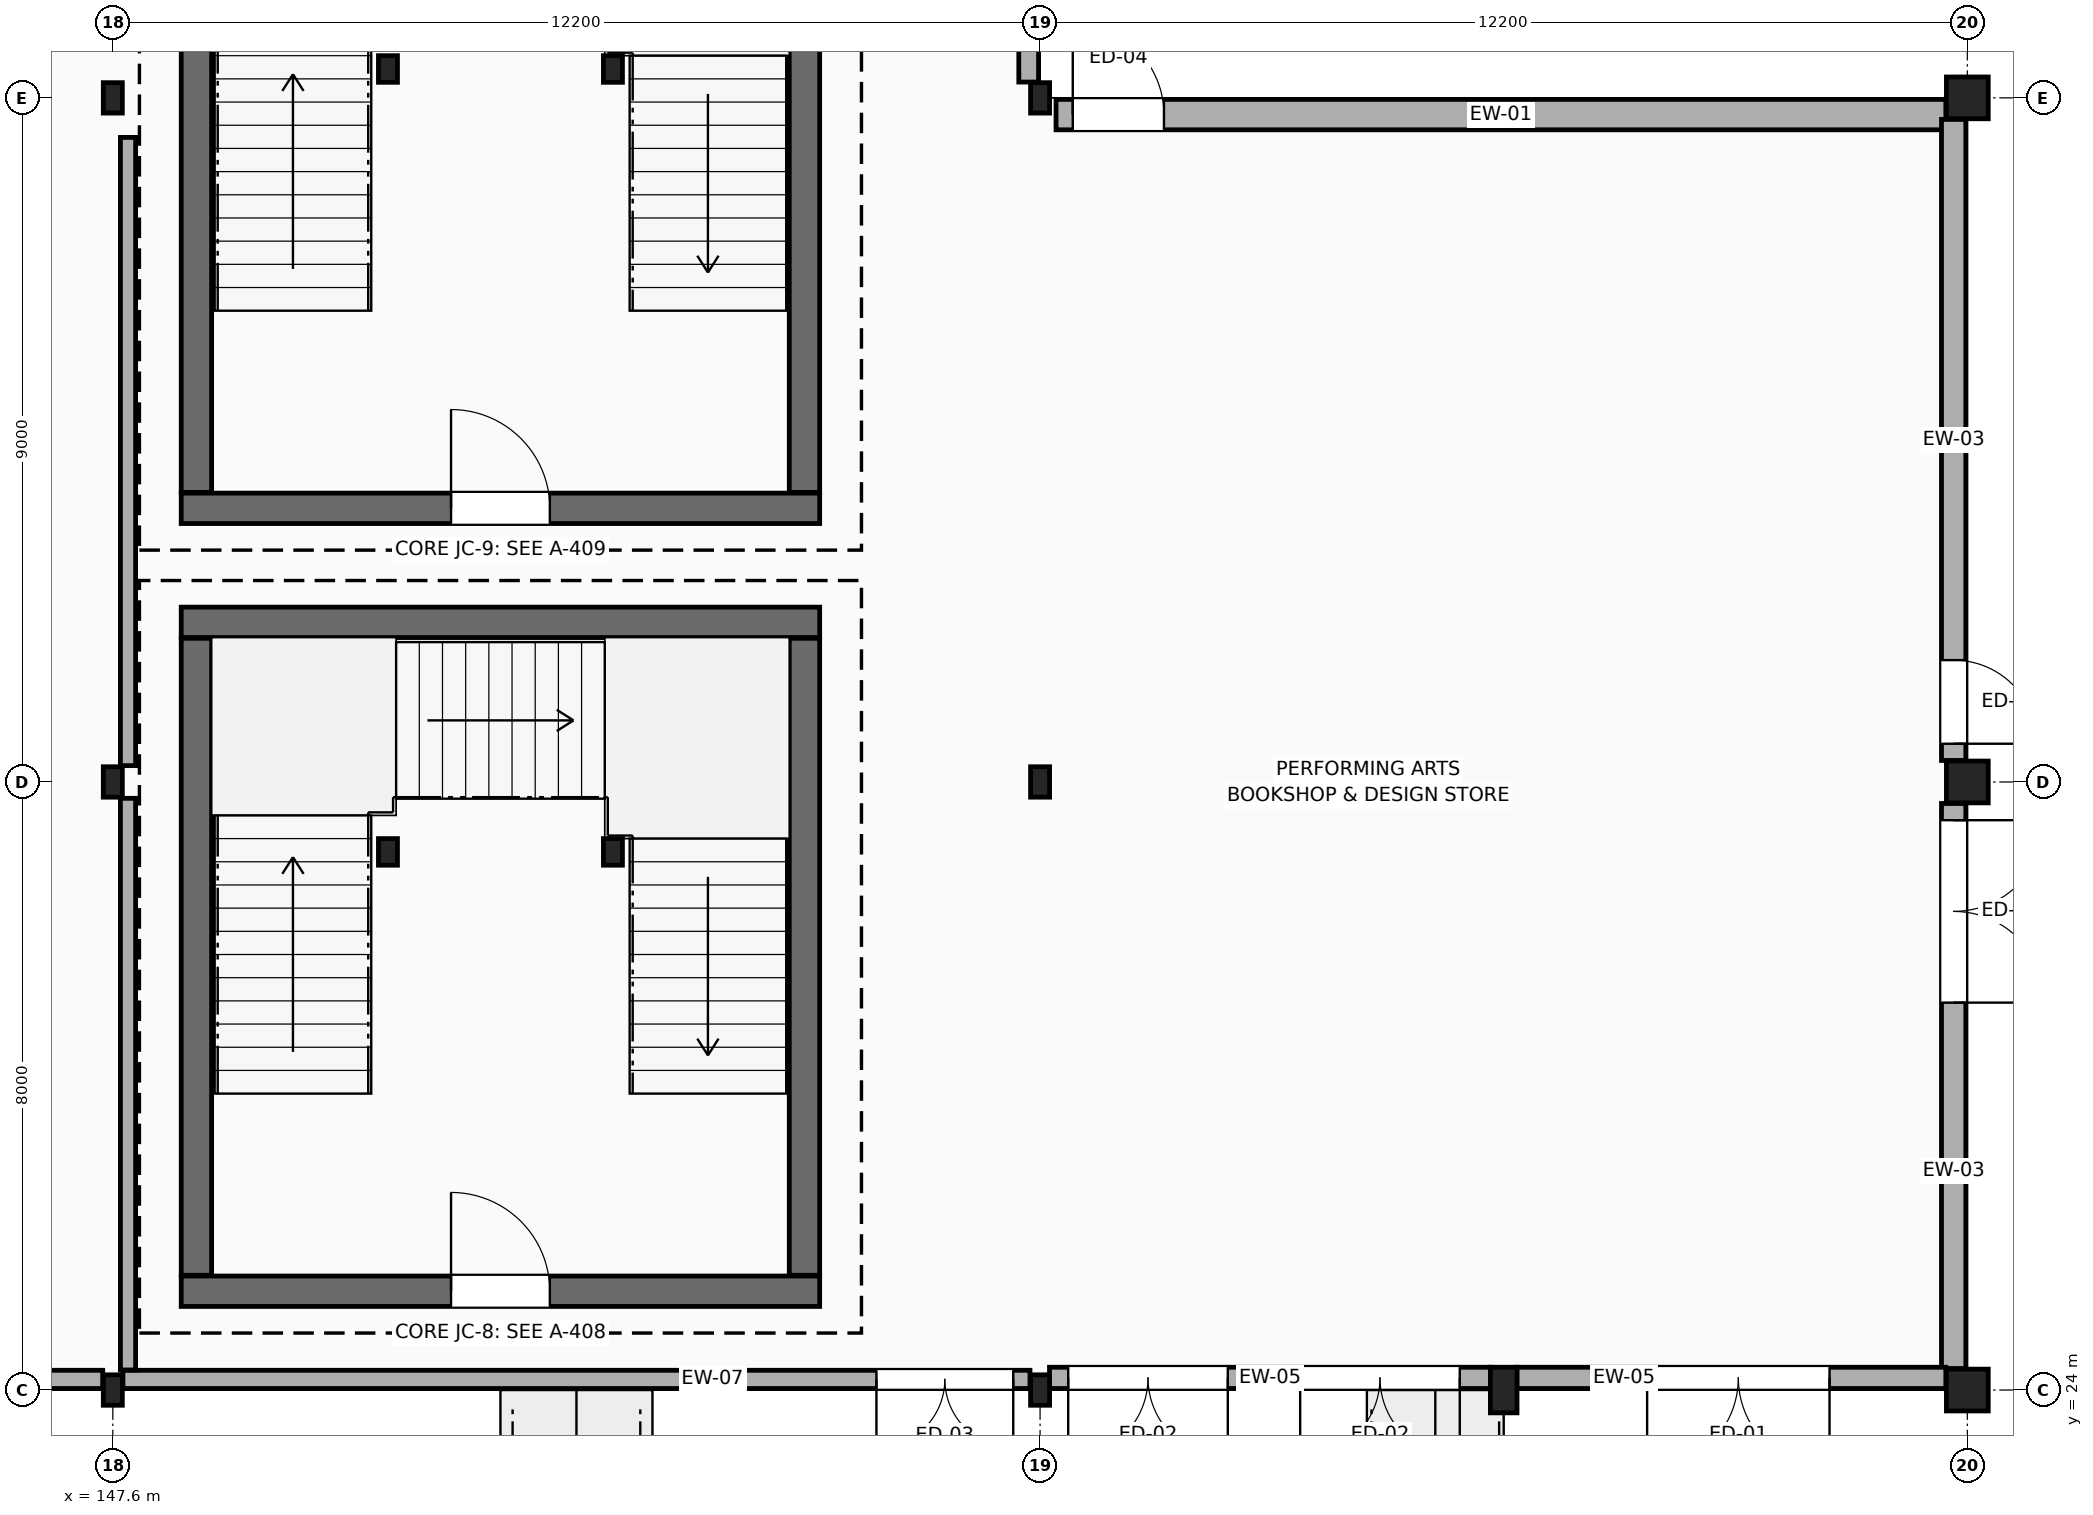
"""IFC4 building model, lengths in metres.
Left out: names, types, materials, properties, quantities, classifications, styles, units other than length and angle.
Written with IfcOpenShell. Run it as: python <this file> out.ifc"""

import sys

from ifc_helpers import new_model, si_unit, direction, frame, frame_2d, origin, origin_2d, place, context, subcontext, project, spatial, rectangle, i_section, extrude, element, fill, save


model = new_model("IFC4")
c1 = context("Model", 3, precision=1e-05, world=origin(), true_north=direction((0.0, 1.0)))
c2 = subcontext(c1, "Body", "Model", "MODEL_VIEW")
j1 = project(units=[si_unit("LENGTHUNIT", "METRE"), si_unit("PLANEANGLEUNIT", "RADIAN")], contexts=[c1])
p1 = place(None, origin())
s1 = spatial("IfcSite", under=j1, at=p1, CompositionType="ELEMENT")
p2 = place(p1, origin())
s2 = spatial("IfcBuilding", under=s1, at=p2, CompositionType="ELEMENT")
p3 = place(p2, origin())
s3 = spatial("IfcBuildingStorey", under=s2, at=p3, CompositionType="ELEMENT", Elevation=0.0)
for number, where, z_axis, x_axis in (
    (1, (147.6, 24.0, 0.0), (0.0, 0.0, 1.0), (1.0, 0.0, 0.0)),
    (2, (147.6, 32.0, 0.0), (0.0, 0.0, 1.0), (1.0, 0.0, 0.0)),
    (3, (147.6, 41.0, 0.0), (0.0, 0.0, 1.0), (1.0, 0.0, 0.0)),
    (4, (159.8, 24.0, 0.0), (0.0, 0.0, 1.0), (1.0, 0.0, 0.0)),
    (5, (159.8, 32.0, 0.0), (0.0, 0.0, 1.0), (1.0, 0.0, 0.0)),
    (6, (159.8, 41.0, 0.0), (0.0, 0.0, 1.0), (1.0, 0.0, 0.0)),
):
    element("IfcColumn", number, at=place(p3, frame(where, z_axis=z_axis, x_axis=x_axis)), inside=s3, PredefinedType="COLUMN", context=c2, shape_type="SweptSolid", body=[
        extrude(i_section(OverallWidth=0.25, OverallDepth=0.4, WebThickness=0.01, FlangeThickness=0.013, FilletRadius=0.014, at=origin_2d()), origin(), (0.0, 0.0, 1.0), 5.4),
    ])
for number, where, z_axis, x_axis in (
    (7, (172.0, 24.0, 0.0), (0.0, 0.0, 1.0), (1.0, 0.0, 0.0)),
    (8, (172.0, 32.0, 0.0), (0.0, 0.0, 1.0), (1.0, 0.0, 0.0)),
    (9, (172.0, 41.0, 0.0), (0.0, 0.0, 1.0), (1.0, 0.0, 0.0)),
):
    element("IfcColumn", number, at=place(p3, frame(where, z_axis=z_axis, x_axis=x_axis)), inside=s3, PredefinedType="COLUMN", context=c2, shape_type="SweptSolid", body=[
        extrude(rectangle(XDim=0.55, YDim=0.55, at=origin_2d()), origin(), (0.0, 0.0, 1.0), 5.36),
    ])
for number, where, z_axis, x_axis in (
    (10, (151.22, 31.08, 0.0), (0.0, 0.0, 1.0), (1.0, 0.0, 0.0)),
    (11, (154.18, 31.08, 0.0), (0.0, 0.0, 1.0), (1.0, 0.0, 0.0)),
    (12, (151.22, 41.38, 0.0), (0.0, 0.0, 1.0), (1.0, 0.0, 0.0)),
    (13, (154.18, 41.38, 0.0), (0.0, 0.0, 1.0), (1.0, 0.0, 0.0)),
):
    element("IfcColumn", number, at=place(p3, frame(where, z_axis=z_axis, x_axis=x_axis)), inside=s3, PredefinedType="COLUMN", context=c2, shape_type="SweptSolid", body=[
        extrude(i_section(OverallWidth=0.25, OverallDepth=0.35, WebThickness=0.01, FlangeThickness=0.012, FilletRadius=0.012, at=origin_2d()), origin(), (0.0, 0.0, 1.0), 5.4),
    ])
p4 = place(p3, frame((165.9, 24.0, 0.0), z_axis=(0.0, 0.0, 1.0), x_axis=(1.0, 0.0, 0.0)))
e14 = element("IfcColumn", 14, at=p4, inside=s3, PredefinedType="PILASTER", context=c2, shape_type="SweptSolid", body=[
    extrude(rectangle(XDim=0.35, YDim=0.6, at=origin_2d()), origin(), (0.0, 0.0, 1.0), 5.4),
])
p5 = place(p3, frame((159.65, 49.792, 0.0), z_axis=(0.0, 0.0, 1.0), x_axis=(0.0, -1.0, 0.0)))
e15 = element("IfcWall", 15, at=p5, inside=s3, PredefinedType="ELEMENTEDWALL", context=c2, shape_type="SweptSolid", body=[
    extrude(rectangle(XDim=8.584, YDim=0.26, at=frame_2d((4.292, 0.0))), origin(), (0.0, 0.0, 1.0), 4.655),
])
p6 = place(p5, frame((0.22, 0.0, 0.0)))
e16 = element("IfcOpeningElement", 16, at=p6, cuts=e15, PredefinedType="OPENING", context=c2, shape_type="SweptSolid", body=[
    extrude(rectangle(XDim=1.8, YDim=2.25, at=frame_2d((0.9, 1.125))), frame((0.0, 0.14, 0.0), z_axis=(0.0, -1.0, 0.0), x_axis=(1.0, 0.0, 0.0)), (0.0, 0.0, 1.0), 0.28),
])
p7 = place(p3, frame((160.01, 40.78, 0.0), z_axis=(0.0, 0.0, 1.0), x_axis=(1.0, 0.0, 0.0)))
e17 = element("IfcWall", 17, at=p7, inside=s3, PredefinedType="STANDARD", context=c2, shape_type="SweptSolid", body=[
    extrude(rectangle(XDim=11.707, YDim=0.4, at=frame_2d((5.854, 0.0))), origin(), (0.0, 0.0, 1.0), 4.555),
])
p8 = place(p7, frame((0.22, 0.0, 0.0)))
e18 = element("IfcOpeningElement", 18, at=p8, cuts=e17, PredefinedType="OPENING", context=c2, shape_type="SweptSolid", body=[
    extrude(rectangle(XDim=1.2, YDim=2.2, at=frame_2d((0.6, 1.1))), frame((0.0, 0.21, 0.0), z_axis=(0.0, -1.0, 0.0), x_axis=(1.0, 0.0, 0.0)), (0.0, 0.0, 1.0), 0.42),
])
p9 = place(p3, frame((171.82, 40.717, 0.0), z_axis=(0.0, 0.0, 1.0), x_axis=(0.0, -1.0, 0.0)))
e19 = element("IfcWall", 19, at=p9, inside=s3, PredefinedType="STANDARD", context=c2, shape_type="SweptSolid", body=[
    extrude(rectangle(XDim=8.434, YDim=0.32, at=frame_2d((4.217, 0.0))), origin(), (0.0, 0.0, 1.0), 4.605),
])
p10 = place(p9, frame((7.114, 0.0, 0.0)))
e20 = element("IfcOpeningElement", 20, at=p10, cuts=e19, PredefinedType="OPENING", context=c2, shape_type="SweptSolid", body=[
    extrude(rectangle(XDim=1.1, YDim=2.2, at=frame_2d((0.55, 1.1))), frame((0.0, 0.17, 0.0), z_axis=(0.0, -1.0, 0.0), x_axis=(1.0, 0.0, 0.0)), (0.0, 0.0, 1.0), 0.34),
])
p11 = place(p3, frame((171.82, 31.717, 0.0), z_axis=(0.0, 0.0, 1.0), x_axis=(0.0, -1.0, 0.0)))
e21 = element("IfcWall", 21, at=p11, inside=s3, PredefinedType="STANDARD", context=c2, shape_type="SweptSolid", body=[
    extrude(rectangle(XDim=7.434, YDim=0.32, at=frame_2d((3.717, 0.0))), origin(), (0.0, 0.0, 1.0), 4.555),
])
p12 = place(p11, frame((0.22, 0.0, 0.0)))
e22 = element("IfcOpeningElement", 22, at=p12, cuts=e21, PredefinedType="OPENING", context=c2, shape_type="SweptSolid", body=[
    extrude(rectangle(XDim=2.4, YDim=2.4, at=frame_2d((1.2, 1.2))), frame((0.0, 0.17, 0.0), z_axis=(0.0, -1.0, 0.0), x_axis=(1.0, 0.0, 0.0)), (0.0, 0.0, 1.0), 0.34),
])
p13 = place(p3, frame((171.717, 24.16, 0.0), z_axis=(0.0, 0.0, 1.0), x_axis=(-1.0, 0.0, 0.0)))
e23 = element("IfcWall", 23, at=p13, inside=s3, PredefinedType="STANDARD", context=c2, shape_type="SweptSolid", body=[
    extrude(rectangle(XDim=5.645, YDim=0.28, at=frame_2d((2.823, 0.0))), origin(), (0.0, 0.0, 1.0), 4.655),
])
p14 = place(p13, frame((1.53, 0.0, 0.0)))
e24 = element("IfcOpeningElement", 24, at=p14, cuts=e23, PredefinedType="OPENING", context=c2, shape_type="SweptSolid", body=[
    extrude(rectangle(XDim=2.4, YDim=2.4, at=frame_2d((1.2, 1.2))), frame((0.0, 0.15, 0.0), z_axis=(0.0, -1.0, 0.0), x_axis=(1.0, 0.0, 0.0)), (0.0, 0.0, 1.0), 0.3),
])
p15 = place(p3, frame((165.728, 24.16, 0.0), z_axis=(0.0, 0.0, 1.0), x_axis=(-1.0, 0.0, 0.0)))
e25 = element("IfcWall", 25, at=p15, inside=s3, PredefinedType="STANDARD", context=c2, shape_type="SweptSolid", body=[
    extrude(rectangle(XDim=5.804, YDim=0.28, at=frame_2d((2.902, 0.0))), origin(), (0.0, 0.0, 1.0), 4.655),
])
p16 = place(p15, frame((0.406, 0.0, 0.0)))
e26 = element("IfcOpeningElement", 26, at=p16, cuts=e25, PredefinedType="OPENING", context=c2, shape_type="SweptSolid", body=[
    extrude(rectangle(XDim=2.1, YDim=2.4, at=frame_2d((1.05, 1.2))), frame((0.0, 0.15, 0.0), z_axis=(0.0, -1.0, 0.0), x_axis=(1.0, 0.0, 0.0)), (0.0, 0.0, 1.0), 0.3),
])
p17 = place(p15, frame((3.458, 0.0, 0.0)))
e27 = element("IfcOpeningElement", 27, at=p17, cuts=e25, PredefinedType="OPENING", context=c2, shape_type="SweptSolid", body=[
    extrude(rectangle(XDim=2.1, YDim=2.4, at=frame_2d((1.05, 1.2))), frame((0.0, 0.15, 0.0), z_axis=(0.0, -1.0, 0.0), x_axis=(1.0, 0.0, 0.0)), (0.0, 0.0, 1.0), 0.3),
])
p18 = place(p3, frame((159.667, 24.14, 0.0), z_axis=(0.0, 0.0, 1.0), x_axis=(-1.0, 0.0, 0.0)))
e28 = element("IfcWall", 28, at=p18, inside=s3, PredefinedType="ELEMENTEDWALL", context=c2, shape_type="SweptSolid", body=[
    extrude(rectangle(XDim=11.934, YDim=0.24, at=frame_2d((5.967, 0.0))), origin(), (0.0, 0.0, 1.0), 4.455),
])
p19 = place(p18, frame((0.22, 0.0, 0.0)))
e29 = element("IfcOpeningElement", 29, at=p19, cuts=e28, PredefinedType="OPENING", context=c2, shape_type="SweptSolid", body=[
    extrude(rectangle(XDim=1.8, YDim=2.25, at=frame_2d((0.9, 1.125))), frame((0.0, 0.13, 0.0), z_axis=(0.0, -1.0, 0.0), x_axis=(1.0, 0.0, 0.0)), (0.0, 0.0, 1.0), 0.26),
])
p20 = place(p3, frame((147.467, 24.14, 0.0), z_axis=(0.0, 0.0, 1.0), x_axis=(-1.0, 0.0, 0.0)))
e30 = element("IfcWall", 30, at=p20, inside=s3, PredefinedType="ELEMENTEDWALL", context=c2, shape_type="SweptSolid", body=[
    extrude(rectangle(XDim=11.684, YDim=0.24, at=frame_2d((5.842, 0.0))), origin(), (0.0, 0.0, 1.0), 4.355),
])
p21 = place(p20, frame((10.264, 0.0, 0.0)))
e31 = element("IfcOpeningElement", 31, at=p21, cuts=e30, PredefinedType="OPENING", context=c2, shape_type="SweptSolid", body=[
    extrude(rectangle(XDim=1.2, YDim=2.2, at=frame_2d((0.6, 1.1))), frame((0.0, 0.13, 0.0), z_axis=(0.0, -1.0, 0.0), x_axis=(1.0, 0.0, 0.0)), (0.0, 0.0, 1.0), 0.26),
])
p22 = place(p3, frame((148.5, 25.3, 0.0), z_axis=(0.0, 0.0, 1.0), x_axis=(1.0, 0.0, 0.0)))
e32 = element("IfcWall", 32, at=p22, inside=s3, PredefinedType="SHEAR", context=c2, shape_type="SweptSolid", body=[
    extrude(rectangle(XDim=8.4, YDim=0.4, at=frame_2d((4.2, 0.0))), origin(), (0.0, 0.0, 1.0), 5.12),
])
p23 = place(p22, frame((3.55, 0.0, 0.0)))
e33 = element("IfcOpeningElement", 33, at=p23, cuts=e32, PredefinedType="OPENING", context=c2, shape_type="SweptSolid", body=[
    extrude(rectangle(XDim=1.3, YDim=2.15, at=frame_2d((0.65, 1.075))), frame((0.0, 0.21, 0.0), z_axis=(0.0, -1.0, 0.0), x_axis=(1.0, 0.0, 0.0)), (0.0, 0.0, 1.0), 0.42),
])
p24 = place(p3, frame((156.9, 34.1, 0.0), z_axis=(0.0, 0.0, 1.0), x_axis=(-1.0, 0.0, 0.0)))
e34 = element("IfcWall", 34, at=p24, inside=s3, PredefinedType="SHEAR", context=c2, shape_type="SweptSolid", body=[
    extrude(rectangle(XDim=8.4, YDim=0.4, at=frame_2d((4.2, 0.0))), origin(), (0.0, 0.0, 1.0), 5.12),
])
for number, where, z_axis, x_axis in (
    (35, (156.7, 25.51, 0.0), (0.0, 0.0, 1.0), (0.0, 1.0, 0.0)),
    (36, (148.7, 33.89, 0.0), (0.0, 0.0, 1.0), (0.0, -1.0, 0.0)),
):
    element("IfcWall", number, at=place(p3, frame(where, z_axis=z_axis, x_axis=x_axis)), inside=s3, PredefinedType="SHEAR", context=c2, shape_type="SweptSolid", body=[
        extrude(rectangle(XDim=8.38, YDim=0.4, at=frame_2d((4.19, 0.0))), origin(), (0.0, 0.0, 1.0), 5.12),
    ])
p25 = place(p3, frame((148.5, 35.6, 0.0), z_axis=(0.0, 0.0, 1.0), x_axis=(1.0, 0.0, 0.0)))
e37 = element("IfcWall", 37, at=p25, inside=s3, PredefinedType="SHEAR", context=c2, shape_type="SweptSolid", body=[
    extrude(rectangle(XDim=8.4, YDim=0.4, at=frame_2d((4.2, 0.0))), origin(), (0.0, 0.0, 1.0), 5.12),
])
p26 = place(p25, frame((3.55, 0.0, 0.0)))
e38 = element("IfcOpeningElement", 38, at=p26, cuts=e37, PredefinedType="OPENING", context=c2, shape_type="SweptSolid", body=[
    extrude(rectangle(XDim=1.3, YDim=2.15, at=frame_2d((0.65, 1.075))), frame((0.0, 0.21, 0.0), z_axis=(0.0, -1.0, 0.0), x_axis=(1.0, 0.0, 0.0)), (0.0, 0.0, 1.0), 0.42),
])
for number, where, z_axis, x_axis in (
    (39, (156.7, 35.81, 0.0), (0.0, 0.0, 1.0), (0.0, 1.0, 0.0)),
    (40, (148.7, 44.19, 0.0), (0.0, 0.0, 1.0), (0.0, -1.0, 0.0)),
):
    element("IfcWall", number, at=place(p3, frame(where, z_axis=z_axis, x_axis=x_axis)), inside=s3, PredefinedType="SHEAR", context=c2, shape_type="SweptSolid", body=[
        extrude(rectangle(XDim=8.38, YDim=0.4, at=frame_2d((4.19, 0.0))), origin(), (0.0, 0.0, 1.0), 5.12),
    ])
p27 = place(p3, frame((147.8, 24.264, 0.0), z_axis=(0.0, 0.0, 1.0), x_axis=(0.0, 1.0, 0.0)))
e41 = element("IfcWall", 41, at=p27, inside=s3, PredefinedType="PARTITIONING", context=c2, shape_type="SweptSolid", body=[
    extrude(rectangle(XDim=7.521, YDim=0.2, at=frame_2d((3.76, 0.0))), origin(), (0.0, 0.0, 1.0), 4.65),
])
p28 = place(p3, frame((147.8, 32.215, 0.0), z_axis=(0.0, 0.0, 1.0), x_axis=(0.0, 1.0, 0.0)))
e42 = element("IfcWall", 42, at=p28, inside=s3, PredefinedType="PARTITIONING", context=c2, shape_type="SweptSolid", body=[
    extrude(rectangle(XDim=8.265, YDim=0.2, at=frame_2d((4.132, 0.0))), origin(), (0.0, 0.0, 1.0), 4.1),
])
p29 = place(p8, origin())
e43 = element("IfcDoor", 43, at=p29, inside=s3, OperationType="SINGLE_SWING_LEFT", PredefinedType="DOOR", context=c2, shape_type="SweptSolid", body=[
    extrude(rectangle(XDim=1.2, YDim=2.2, at=frame_2d((0.6, 1.1))), frame((0.0, 0.025, 0.0), z_axis=(0.0, -1.0, 0.0), x_axis=(1.0, 0.0, 0.0)), (0.0, 0.0, 1.0), 0.05),
])
fill(e18, e43)
p30 = place(p10, origin())
e44 = element("IfcDoor", 44, at=p30, inside=s3, OperationType="SINGLE_SWING_RIGHT", PredefinedType="DOOR", context=c2, shape_type="SweptSolid", body=[
    extrude(rectangle(XDim=1.1, YDim=2.2, at=frame_2d((0.55, 1.1))), frame((0.0, 0.025, 0.0), z_axis=(0.0, -1.0, 0.0), x_axis=(1.0, 0.0, 0.0)), (0.0, 0.0, 1.0), 0.05),
])
fill(e20, e44)
p31 = place(p12, origin())
e45 = element("IfcDoor", 45, at=p31, inside=s3, OperationType="DOUBLE_SWING_LEFT", PredefinedType="DOOR", context=c2, shape_type="SweptSolid", body=[
    extrude(rectangle(XDim=2.4, YDim=2.4, at=frame_2d((1.2, 1.2))), frame((0.0, 0.025, 0.0), z_axis=(0.0, -1.0, 0.0), x_axis=(1.0, 0.0, 0.0)), (0.0, 0.0, 1.0), 0.05),
])
fill(e22, e45)
p32 = place(p14, origin())
e46 = element("IfcDoor", 46, at=p32, inside=s3, OperationType="DOUBLE_SWING_LEFT", PredefinedType="DOOR", context=c2, shape_type="SweptSolid", body=[
    extrude(rectangle(XDim=2.4, YDim=2.4, at=frame_2d((1.2, 1.2))), frame((0.0, 0.025, 0.0), z_axis=(0.0, -1.0, 0.0), x_axis=(1.0, 0.0, 0.0)), (0.0, 0.0, 1.0), 0.05),
])
fill(e24, e46)
p33 = place(p16, origin())
e47 = element("IfcDoor", 47, at=p33, inside=s3, OperationType="DOUBLE_SWING_RIGHT", PredefinedType="DOOR", context=c2, shape_type="SweptSolid", body=[
    extrude(rectangle(XDim=2.1, YDim=2.4, at=frame_2d((1.05, 1.2))), frame((0.0, 0.025, 0.0), z_axis=(0.0, -1.0, 0.0), x_axis=(1.0, 0.0, 0.0)), (0.0, 0.0, 1.0), 0.05),
])
fill(e26, e47)
p34 = place(p17, origin())
e48 = element("IfcDoor", 48, at=p34, inside=s3, OperationType="DOUBLE_SWING_RIGHT", PredefinedType="DOOR", context=c2, shape_type="SweptSolid", body=[
    extrude(rectangle(XDim=2.1, YDim=2.4, at=frame_2d((1.05, 1.2))), frame((0.0, 0.025, 0.0), z_axis=(0.0, -1.0, 0.0), x_axis=(1.0, 0.0, 0.0)), (0.0, 0.0, 1.0), 0.05),
])
fill(e27, e48)
p35 = place(p19, origin())
e49 = element("IfcDoor", 49, at=p35, inside=s3, OperationType="DOUBLE_DOOR_SINGLE_SWING", PredefinedType="DOOR", context=c2, shape_type="SweptSolid", body=[
    extrude(rectangle(XDim=1.8, YDim=2.25, at=frame_2d((0.9, 1.125))), frame((0.0, 0.025, 0.0), z_axis=(0.0, -1.0, 0.0), x_axis=(1.0, 0.0, 0.0)), (0.0, 0.0, 1.0), 0.05),
])
fill(e29, e49)
p36 = place(p23, origin())
e50 = element("IfcDoor", 50, at=p36, inside=s3, OperationType="SINGLE_SWING_LEFT", PredefinedType="DOOR", context=c2, shape_type="SweptSolid", body=[
    extrude(rectangle(XDim=1.3, YDim=2.15, at=frame_2d((0.65, 1.075))), frame((0.0, 0.025, 0.0), z_axis=(0.0, -1.0, 0.0), x_axis=(1.0, 0.0, 0.0)), (0.0, 0.0, 1.0), 0.05),
])
fill(e33, e50)
p37 = place(p26, origin())
e51 = element("IfcDoor", 51, at=p37, inside=s3, OperationType="SINGLE_SWING_LEFT", PredefinedType="DOOR", context=c2, shape_type="SweptSolid", body=[
    extrude(rectangle(XDim=1.3, YDim=2.15, at=frame_2d((0.65, 1.075))), frame((0.0, 0.025, 0.0), z_axis=(0.0, -1.0, 0.0), x_axis=(1.0, 0.0, 0.0)), (0.0, 0.0, 1.0), 0.05),
])
fill(e38, e51)
save(model, sys.argv[1])
